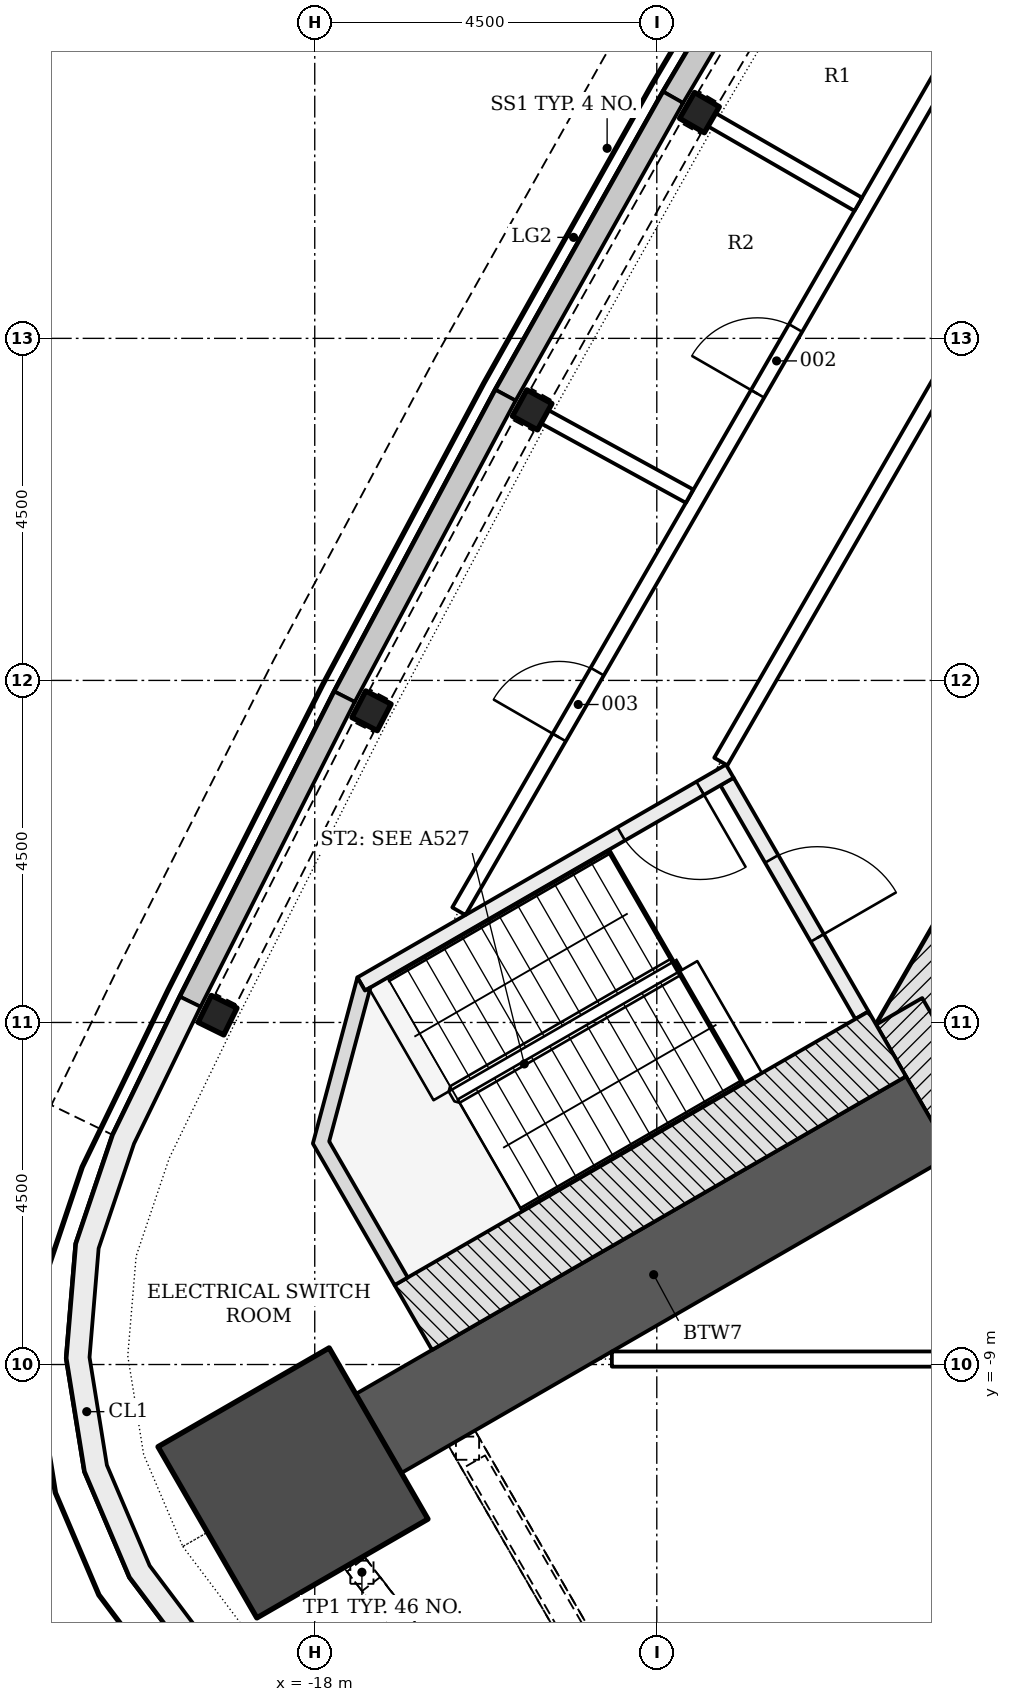
"""IFC4 building model, lengths in metres.
Left out: names, types, materials, properties, quantities, classifications, styles, units other than length and angle.
Written with IfcOpenShell. Run it as: python <this file> out.ifc"""

import sys

from ifc_helpers import new_model, si_unit, direction, frame, frame_2d, origin, origin_2d, place, context, subcontext, project, spatial, polyline, rectangle, i_section, outline, extrude, element, fill, save


model = new_model("IFC4")
c1 = context("Model", 3, precision=1e-05, world=origin(), true_north=direction((0.0, 1.0)))
c2 = subcontext(c1, "Body", "Model", "MODEL_VIEW")
j1 = project(units=[si_unit("LENGTHUNIT", "METRE"), si_unit("PLANEANGLEUNIT", "RADIAN")], contexts=[c1])
p1 = place(None, origin())
s1 = spatial("IfcSite", under=j1, at=p1, CompositionType="ELEMENT")
p2 = place(p1, origin())
s2 = spatial("IfcBuilding", under=s1, at=p2, CompositionType="ELEMENT")
p3 = place(p2, frame((0.0, 0.0, 210.3)))
s3 = spatial("IfcBuildingStorey", under=s2, at=p3, CompositionType="ELEMENT", Elevation=210.3)
p4 = place(p3, frame((-1.083, 11.281, -0.3), z_axis=(0.0, 0.0, 1.0), x_axis=(-0.500001446645, -0.866024568562, 0.0)))
e1 = element("IfcWall", 1, at=p4, inside=s3, PredefinedType="SHEAR", context=c2, shape_type="SweptSolid", body=[
    extrude(rectangle(XDim=18.458, YDim=0.7, at=frame_2d((9.229, 0.0))), origin(), (0.0, 0.0, 1.0), 4.6),
])
p5 = place(p4, frame((8.979, 0.0, 0.3)))
e2 = element("IfcOpeningElement", 2, at=p5, cuts=e1, PredefinedType="OPENING", context=c2, shape_type="SweptSolid", body=[
    extrude(rectangle(XDim=1.2, YDim=2.1, at=frame_2d((0.6, 1.05))), frame((0.0, 0.36, 0.0), z_axis=(0.0, -1.0, 0.0), x_axis=(1.0, 0.0, 0.0)), (0.0, 0.0, 1.0), 0.72),
])
p6 = place(p4, frame((11.029, 0.0, 0.3)))
e3 = element("IfcOpeningElement", 3, at=p6, cuts=e1, PredefinedType="OPENING", context=c2, shape_type="SweptSolid", body=[
    extrude(rectangle(XDim=1.2, YDim=2.1, at=frame_2d((0.6, 1.05))), frame((0.0, 0.36, 0.0), z_axis=(0.0, -1.0, 0.0), x_axis=(1.0, 0.0, 0.0)), (0.0, 0.0, 1.0), 0.72),
])
p7 = place(p3, frame((-10.311, -4.353, -0.3), z_axis=(0.0, 0.0, 1.0), x_axis=(0.500042739161, -0.866000726912, 0.0)))
e4 = element("IfcWall", 4, at=p7, inside=s3, PredefinedType="SHEAR", context=c2, shape_type="SweptSolid", body=[
    extrude(rectangle(XDim=2.771, YDim=0.7, at=frame_2d((1.386, 0.0))), origin(), (0.0, 0.0, 1.0), 4.6),
])
p8 = place(p3, frame((-9.922, -5.728, -0.3), z_axis=(0.0, 0.0, 1.0), x_axis=(-0.866030911543, -0.499990460161, 0.0)))
e5 = element("IfcWall", 5, at=p8, inside=s3, PredefinedType="SHEAR", context=c2, shape_type="SweptSolid", body=[
    extrude(rectangle(XDim=8.359, YDim=1.2, at=frame_2d((4.179, 0.0))), origin(), (0.0, 0.0, 1.0), 4.6),
])
p9 = place(p3, frame((-18.286, -10.558, -0.3), z_axis=(0.0, 0.0, 1.0), x_axis=(-0.866025403784, -0.5, 0.0)))
e6 = element("IfcColumn", 6, at=p9, inside=s3, PredefinedType="COLUMN", context=c2, shape_type="SweptSolid", body=[
    extrude(rectangle(XDim=2.6, YDim=2.6, at=origin_2d()), origin(), (0.0, 0.0, 1.0), 4.6),
])
for number, where, z_axis, x_axis in (
    (7, (-12.939, 7.47, -0.3), (0.0, 0.0, 1.0), (-0.5, -0.866, 0.0)),
    (8, (-15.14, 3.559, -0.3), (0.0, 0.0, 1.0), (-0.481, -0.877, 0.0)),
    (9, (-17.253, -0.4, -0.3), (0.0, 0.0, 1.0), (-0.461, -0.887, 0.0)),
    (10, (-19.279, -4.404, -0.3), (0.0, 0.0, 1.0), (-0.441, -0.897, 0.0)),
):
    element("IfcColumn", number, at=place(p3, frame(where, z_axis=z_axis, x_axis=x_axis)), inside=s3, PredefinedType="COLUMN", context=c2, shape_type="SweptSolid", body=[
        extrude(i_section(OverallWidth=0.394, OverallDepth=0.376, WebThickness=0.017, FlangeThickness=0.028, FilletRadius=0.015, at=origin_2d()), origin(), (0.0, 0.0, 1.0), 4.6),
    ])
p10 = place(p3, origin())
e11 = element("IfcWall", 11, at=p10, inside=s3, PredefinedType="NOTDEFINED", context=c2, shape_type="SweptSolid", body=[
    extrude(outline(polyline([(-11.122, 11.617), (-13.415, 7.745), (-13.157, 7.592), (-10.864, 11.464), (-11.122, 11.617)])), origin(), (0.0, 0.0, 1.0), 1.2),
])
p11 = place(p3, origin())
e12 = element("IfcWall", 12, at=p11, inside=s3, PredefinedType="NOTDEFINED", context=c2, shape_type="SweptSolid", body=[
    extrude(outline(polyline([(-13.415, 7.745), (-15.622, 3.823), (-15.36, 3.677), (-13.154, 7.598), (-13.415, 7.745)])), origin(), (0.0, 0.0, 1.0), 1.2),
])
p12 = place(p3, origin())
e13 = element("IfcWall", 13, at=p12, inside=s3, PredefinedType="NOTDEFINED", context=c2, shape_type="SweptSolid", body=[
    extrude(outline(polyline([(-15.622, 3.823), (-17.741, -0.146), (-17.477, -0.287), (-15.357, 3.682), (-15.622, 3.823)])), origin(), (0.0, 0.0, 1.0), 1.2),
])
p13 = place(p3, origin())
e14 = element("IfcWall", 14, at=p13, inside=s3, PredefinedType="NOTDEFINED", context=c2, shape_type="SweptSolid", body=[
    extrude(outline(polyline([(-17.741, -0.146), (-19.772, -4.162), (-19.504, -4.297), (-17.473, -0.281), (-17.741, -0.146)])), origin(), (0.0, 0.0, 1.0), 1.2),
])
p14 = place(p3, origin())
e15 = element("IfcWall", 15, at=p14, inside=s3, PredefinedType="NOTDEFINED", context=c2, shape_type="SweptSolid", body=[
    extrude(outline(polyline([(-19.772, -4.162), (-20.656, -5.98), (-21.139, -7.411), (-21.265, -8.917), (-21.025, -10.408), (-20.434, -11.797), (-19.526, -13.004), (-18.354, -13.958), (-16.988, -14.602), (-15.507, -14.898), (-15.448, -14.604), (-16.893, -14.315), (-18.193, -13.702), (-19.308, -12.795), (-20.172, -11.646), (-20.735, -10.324), (-20.963, -8.905), (-20.844, -7.473), (-20.378, -6.094), (-19.502, -4.293), (-19.772, -4.162)])), origin(), (0.0, 0.0, 1.0), 4.3),
])
p15 = place(p3, frame((-12.576, -1.331, -0.3), z_axis=(0.0, 0.0, 1.0), x_axis=(0.499970499736, -0.8660424351, 0.0)))
e16 = element("IfcWall", 16, at=p15, inside=s3, PredefinedType="SHEAR", context=c2, shape_type="SweptSolid", body=[
    extrude(rectangle(XDim=3.55, YDim=0.2, at=frame_2d((1.775, 0.0))), origin(), (0.0, 0.0, 1.0), 4.6),
])
p16 = place(p15, frame((1.175, 0.0, 0.3)))
e17 = element("IfcOpeningElement", 17, at=p16, cuts=e16, PredefinedType="OPENING", context=c2, shape_type="SweptSolid", body=[
    extrude(rectangle(XDim=1.2, YDim=2.1, at=frame_2d((0.6, 1.05))), frame((0.0, 0.11, 0.0), z_axis=(0.0, -1.0, 0.0), x_axis=(1.0, 0.0, 0.0)), (0.0, 0.0, 1.0), 0.22),
])
p17 = place(p3, frame((-12.539, -1.194, -0.3), z_axis=(0.0, 0.0, 1.0), x_axis=(-0.866045472092, -0.499965239061, 0.0)))
e18 = element("IfcWall", 18, at=p17, inside=s3, PredefinedType="SHEAR", context=c2, shape_type="SweptSolid", body=[
    extrude(rectangle(XDim=5.6, YDim=0.2, at=frame_2d((2.8, 0.0))), origin(), (0.0, 0.0, 1.0), 4.6),
])
p18 = place(p17, frame((0.45, 0.0, 0.3)))
e19 = element("IfcOpeningElement", 19, at=p18, cuts=e18, PredefinedType="OPENING", context=c2, shape_type="SweptSolid", body=[
    extrude(rectangle(XDim=1.2, YDim=2.1, at=frame_2d((0.6, 1.05))), frame((0.0, 0.11, 0.0), z_axis=(0.0, -1.0, 0.0), x_axis=(1.0, 0.0, 0.0)), (0.0, 0.0, 1.0), 0.22),
])
p19 = place(p3, frame((-10.468, -4.782, -0.3), z_axis=(0.0, 0.0, 1.0), x_axis=(-0.866018442252, -0.500012057535, 0.0)))
e20 = element("IfcWall", 20, at=p19, inside=s3, PredefinedType="SHEAR", context=c2, shape_type="SweptSolid", body=[
    extrude(rectangle(XDim=7.2, YDim=0.986, at=frame_2d((3.6, 0.0))), origin(), (0.0, 0.0, 1.0), 4.6),
])
p20 = place(p3, frame((0.0, 0.0, -0.3)))
e21 = element("IfcWall", 21, at=p20, inside=s3, PredefinedType="SHEAR", context=c2, shape_type="SweptSolid", body=[
    extrude(outline(polyline([(-17.439, -3.907), (-18.025, -6.093), (-16.95, -7.955), (-16.777, -7.855), (-17.81, -6.065), (-17.267, -4.039), (-17.339, -4.081), (-17.339, -4.081), (-17.339, -4.081), (-17.339, -4.081), (-17.339, -4.081), (-17.339, -4.081), (-17.339, -4.081), (-17.339, -4.081), (-17.339, -4.081), (-17.339, -4.081), (-17.339, -4.081), (-17.339, -4.081), (-17.339, -4.081), (-17.339, -4.081), (-17.339, -4.081), (-17.339, -4.081), (-17.339, -4.081), (-17.439, -3.907)])), origin(), (0.0, 0.0, 1.0), 4.6),
])
p21 = place(p3, frame((-0.68, 19.678, 0.0), z_axis=(0.0, 0.0, 1.0), x_axis=(-0.49999622545, -0.866027583011, 0.0)))
e22 = element("IfcWall", 22, at=p21, inside=s3, PredefinedType="PARTITIONING", context=c2, shape_type="SweptSolid", body=[
    extrude(rectangle(XDim=23.956, YDim=0.2, at=frame_2d((11.978, 0.0))), origin(), (0.0, 0.0, 1.0), 3.752),
])
p22 = place(p21, frame((16.301, 0.0, 0.0)))
e23 = element("IfcOpeningElement", 23, at=p22, cuts=e22, PredefinedType="OPENING", context=c2, shape_type="SweptSolid", body=[
    extrude(rectangle(XDim=1.2, YDim=2.1, at=frame_2d((0.6, 1.05))), frame((0.0, 0.11, 0.0), z_axis=(0.0, -1.0, 0.0), x_axis=(1.0, 0.0, 0.0)), (0.0, 0.0, 1.0), 0.22),
])
p23 = place(p3, frame((-16.104, -3.037, 0.0), z_axis=(0.0, 0.0, 1.0), x_axis=(0.499996511208, 0.86602741803, 0.0)))
e24 = element("IfcWall", 24, at=p23, inside=s3, PredefinedType="PARTITIONING", context=c2, shape_type="SweptSolid", body=[
    extrude(rectangle(XDim=29.74, YDim=0.2, at=frame_2d((14.87, 0.0))), origin(), (0.0, 0.0, 1.0), 3.752),
])
p24 = place(p23, frame((19.661, 0.0, 0.0)))
e25 = element("IfcOpeningElement", 25, at=p24, cuts=e24, PredefinedType="OPENING", context=c2, shape_type="SweptSolid", body=[
    extrude(rectangle(XDim=1.0, YDim=2.1, at=frame_2d((0.5, 1.05))), frame((0.0, 0.11, 0.0), z_axis=(0.0, -1.0, 0.0), x_axis=(1.0, 0.0, 0.0)), (0.0, 0.0, 1.0), 0.22),
])
p25 = place(p23, frame((7.86, 0.0, 0.0)))
e26 = element("IfcOpeningElement", 26, at=p25, cuts=e24, PredefinedType="OPENING", context=c2, shape_type="SweptSolid", body=[
    extrude(rectangle(XDim=1.0, YDim=2.1, at=frame_2d((0.5, 1.05))), frame((0.0, 0.11, 0.0), z_axis=(0.0, -1.0, 0.0), x_axis=(1.0, 0.0, 0.0)), (0.0, 0.0, 1.0), 0.22),
])
p26 = place(p23, frame((2.64, 0.0, 0.0)))
e27 = element("IfcOpeningElement", 27, at=p26, cuts=e24, PredefinedType="OPENING", context=c2, shape_type="SweptSolid", body=[
    extrude(rectangle(XDim=1.0, YDim=2.1, at=frame_2d((0.5, 1.05))), frame((0.0, 0.11, 0.0), z_axis=(0.0, -1.0, 0.0), x_axis=(1.0, 0.0, 0.0)), (0.0, 0.0, 1.0), 0.22),
])
p27 = place(p3, frame((-12.809, 7.395, 0.0), z_axis=(0.0, 0.0, 1.0), x_axis=(0.866036427558, -0.499980905779, 0.0)))
e28 = element("IfcWall", 28, at=p27, inside=s3, PredefinedType="PARTITIONING", context=c2, shape_type="SweptSolid", body=[
    extrude(rectangle(XDim=2.262, YDim=0.2, at=frame_2d((1.131, 0.0))), origin(), (0.0, 0.0, 1.0), 3.752),
])
p28 = place(p3, frame((-15.008, 3.487, 0.0), z_axis=(0.0, 0.0, 1.0), x_axis=(0.876893493113, -0.480684721763, 0.0)))
e29 = element("IfcWall", 29, at=p28, inside=s3, PredefinedType="PARTITIONING", context=c2, shape_type="SweptSolid", body=[
    extrude(rectangle(XDim=2.211, YDim=0.2, at=frame_2d((1.105, 0.0))), origin(), (0.0, 0.0, 1.0), 3.752),
])
p29 = place(p3, frame((-14.091, -8.928, 0.0), z_axis=(0.0, 0.0, 1.0), x_axis=(1.0, 0.0, 0.0)))
e30 = element("IfcWall", 30, at=p29, inside=s3, PredefinedType="PARTITIONING", context=c2, shape_type="SweptSolid", body=[
    extrude(rectangle(XDim=18.991, YDim=0.2, at=frame_2d((9.495, 0.0))), origin(), (0.0, 0.0, 1.0), 4.3),
])
p30 = place(p29, frame((10.411, 0.0, 0.0)))
e31 = element("IfcOpeningElement", 31, at=p30, cuts=e30, PredefinedType="OPENING", context=c2, shape_type="SweptSolid", body=[
    extrude(rectangle(XDim=1.0, YDim=2.1, at=frame_2d((0.5, 1.05))), frame((0.0, 0.11, 0.0), z_axis=(0.0, -1.0, 0.0), x_axis=(1.0, 0.0, 0.0)), (0.0, 0.0, 1.0), 0.22),
])
p31 = place(p16, origin())
e32 = element("IfcDoor", 32, at=p31, inside=s3, OperationType="SINGLE_SWING_RIGHT", PredefinedType="DOOR", context=c2, shape_type="SweptSolid", body=[
    extrude(rectangle(XDim=1.2, YDim=2.1, at=frame_2d((0.6, 1.05))), frame((0.0, 0.025, 0.0), z_axis=(0.0, -1.0, 0.0), x_axis=(1.0, 0.0, 0.0)), (0.0, 0.0, 1.0), 0.05),
])
fill(e17, e32)
p32 = place(p18, origin())
e33 = element("IfcDoor", 33, at=p32, inside=s3, OperationType="SINGLE_SWING_LEFT", PredefinedType="DOOR", context=c2, shape_type="SweptSolid", body=[
    extrude(rectangle(XDim=1.2, YDim=2.1, at=frame_2d((0.6, 1.05))), frame((0.0, 0.025, 0.0), z_axis=(0.0, -1.0, 0.0), x_axis=(1.0, 0.0, 0.0)), (0.0, 0.0, 1.0), 0.05),
])
fill(e19, e33)
p33 = place(p25, origin())
e34 = element("IfcDoor", 34, at=p33, inside=s3, OperationType="SINGLE_SWING_LEFT", PredefinedType="DOOR", context=c2, shape_type="SweptSolid", body=[
    extrude(rectangle(XDim=1.0, YDim=2.1, at=frame_2d((0.5, 1.05))), frame((0.0, 0.025, 0.0), z_axis=(0.0, -1.0, 0.0), x_axis=(1.0, 0.0, 0.0)), (0.0, 0.0, 1.0), 0.05),
])
fill(e26, e34)
p34 = place(p26, origin())
e35 = element("IfcDoor", 35, at=p34, inside=s3, OperationType="SINGLE_SWING_LEFT", PredefinedType="DOOR", context=c2, shape_type="SweptSolid", body=[
    extrude(rectangle(XDim=1.0, YDim=2.1, at=frame_2d((0.5, 1.05))), frame((0.0, 0.025, 0.0), z_axis=(0.0, -1.0, 0.0), x_axis=(1.0, 0.0, 0.0)), (0.0, 0.0, 1.0), 0.05),
])
fill(e27, e35)
save(model, sys.argv[1])
